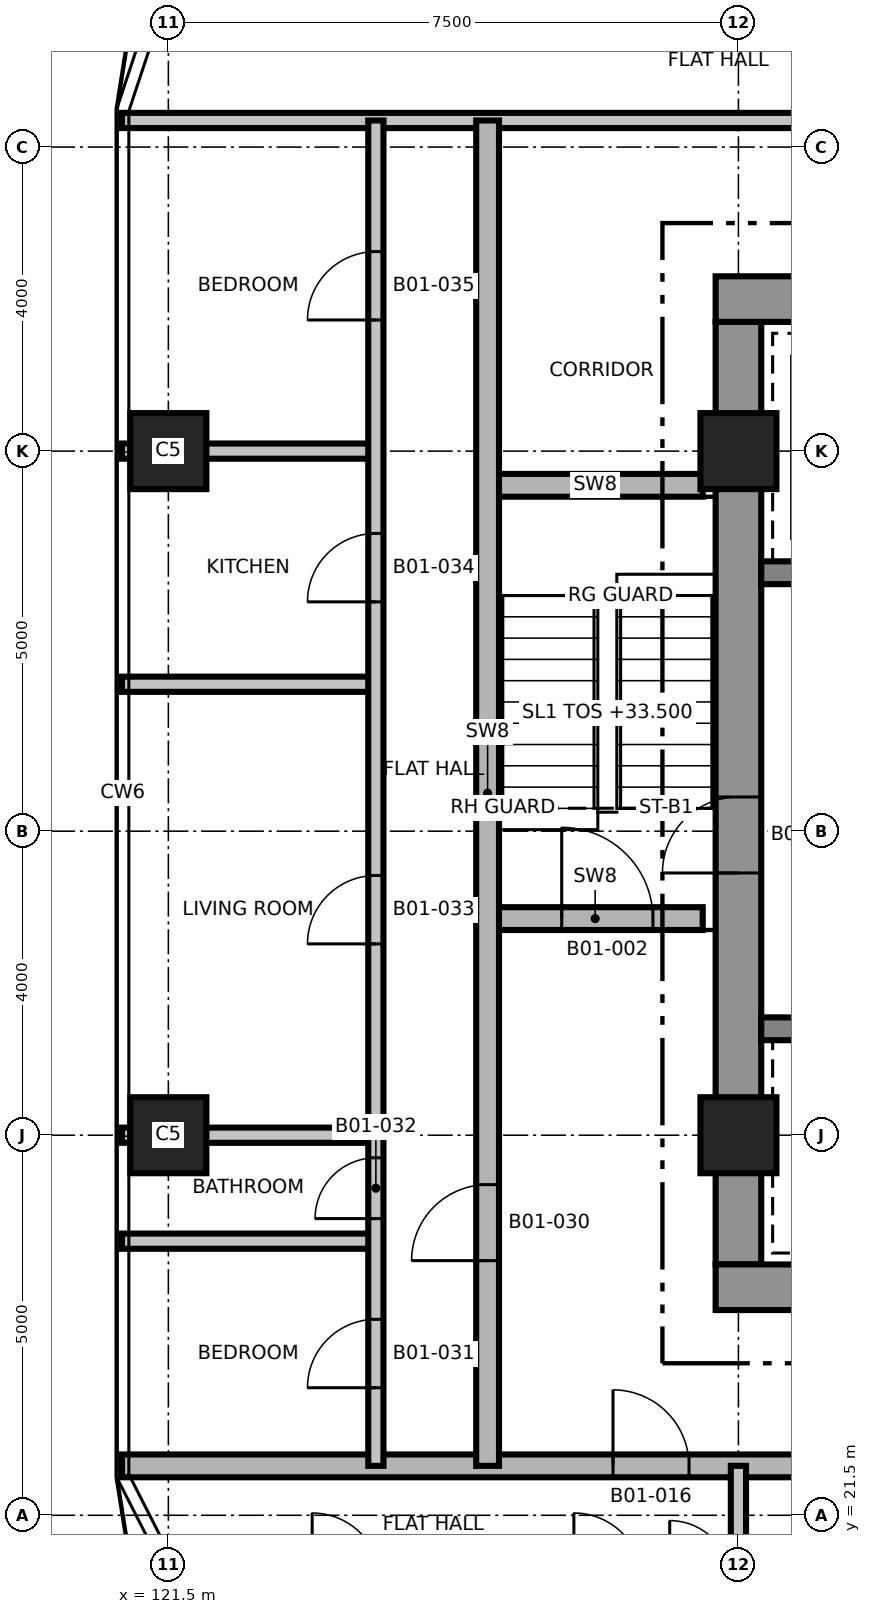
"""IFC4 building model, lengths in metres.
Left out: names, types, materials, properties, quantities, classifications, styles, units other than length and angle.
Written with IfcOpenShell. Run it as: python <this file> out.ifc"""

import sys

from ifc_helpers import new_model, si_unit, direction, frame, frame_2d, origin, origin_2d, place, context, subcontext, project, spatial, rectangle, extrude, element, fill, save


model = new_model("IFC4")
c1 = context("Model", 3, precision=1e-05, world=origin(), true_north=direction((0.0, 1.0)))
c2 = subcontext(c1, "Body", "Model", "MODEL_VIEW")
j1 = project(units=[si_unit("LENGTHUNIT", "METRE"), si_unit("PLANEANGLEUNIT", "RADIAN")], contexts=[c1])
p1 = place(None, origin())
s1 = spatial("IfcSite", under=j1, at=p1, CompositionType="ELEMENT")
p2 = place(p1, origin())
s2 = spatial("IfcBuilding", under=s1, at=p2, CompositionType="ELEMENT")
p3 = place(p2, frame((0.0, 0.0, 33.5)))
s3 = spatial("IfcBuildingStorey", under=s2, at=p3, CompositionType="ELEMENT", Elevation=33.5)
p4 = place(p3, frame((129.0, 24.8, 0.0), z_axis=(0.0, 0.0, 1.0), x_axis=(0.0, 1.0, 0.0)))
e1 = element("IfcWall", 1, at=p4, inside=s3, PredefinedType="SHEAR", context=c2, shape_type="SweptSolid", body=[
    extrude(rectangle(XDim=12.4, YDim=0.6, at=frame_2d((6.2, 0.0))), origin(), (0.0, 0.0, 1.0), 3.7),
])
p5 = place(p4, frame((5.15, 0.0, 0.0)))
e2 = element("IfcOpeningElement", 2, at=p5, cuts=e1, PredefinedType="OPENING", context=c2, shape_type="SweptSolid", body=[
    extrude(rectangle(XDim=1.0, YDim=2.1, at=frame_2d((0.5, 1.05))), frame((0.0, 0.31, 0.0), z_axis=(0.0, -1.0, 0.0), x_axis=(1.0, 0.0, 0.0)), (0.0, 0.0, 1.0), 0.62),
])
p6 = place(p3, frame((128.7, 24.5, 0.0), z_axis=(0.0, 0.0, 1.0), x_axis=(1.0, 0.0, 0.0)))
e3 = element("IfcWall", 3, at=p6, inside=s3, PredefinedType="SHEAR", context=c2, shape_type="SweptSolid", body=[
    extrude(rectangle(XDim=15.0, YDim=0.6, at=frame_2d((7.5, 0.0))), origin(), (0.0, 0.0, 1.0), 3.7),
])
p7 = place(p6, frame((9.65, 0.0, 0.0)))
e4 = element("IfcOpeningElement", 4, at=p7, cuts=e3, PredefinedType="OPENING", context=c2, shape_type="SweptSolid", body=[
    extrude(rectangle(XDim=1.5, YDim=2.1, at=frame_2d((0.75, 1.05))), frame((0.0, 0.31, 0.0), z_axis=(0.0, -1.0, 0.0), x_axis=(1.0, 0.0, 0.0)), (0.0, 0.0, 1.0), 0.62),
])
p8 = place(p6, frame((1.25, 0.0, 0.0)))
e5 = element("IfcOpeningElement", 5, at=p8, cuts=e3, PredefinedType="OPENING", context=c2, shape_type="SweptSolid", body=[
    extrude(rectangle(XDim=0.9, YDim=2.1, at=frame_2d((0.45, 1.05))), frame((0.0, 0.31, 0.0), z_axis=(0.0, -1.0, 0.0), x_axis=(1.0, 0.0, 0.0)), (0.0, 0.0, 1.0), 0.62),
])
p9 = place(p3, frame((128.7, 37.5, 0.0), z_axis=(0.0, 0.0, 1.0), x_axis=(1.0, 0.0, 0.0)))
e6 = element("IfcWall", 6, at=p9, inside=s3, PredefinedType="SHEAR", context=c2, shape_type="SweptSolid", body=[
    extrude(rectangle(XDim=15.0, YDim=0.6, at=frame_2d((7.5, 0.0))), origin(), (0.0, 0.0, 1.0), 3.7),
])
p10 = place(p9, frame((9.65, 0.0, 0.0)))
e7 = element("IfcOpeningElement", 7, at=p10, cuts=e6, PredefinedType="OPENING", context=c2, shape_type="SweptSolid", body=[
    extrude(rectangle(XDim=1.5, YDim=2.1, at=frame_2d((0.75, 1.05))), frame((0.0, 0.31, 0.0), z_axis=(0.0, -1.0, 0.0), x_axis=(1.0, 0.0, 0.0)), (0.0, 0.0, 1.0), 0.62),
])
p11 = place(p9, frame((12.85, 0.0, 0.0)))
e8 = element("IfcOpeningElement", 8, at=p11, cuts=e6, PredefinedType="OPENING", context=c2, shape_type="SweptSolid", body=[
    extrude(rectangle(XDim=0.9, YDim=2.1, at=frame_2d((0.45, 1.05))), frame((0.0, 0.31, 0.0), z_axis=(0.0, -1.0, 0.0), x_axis=(1.0, 0.0, 0.0)), (0.0, 0.0, 1.0), 0.62),
])
p12 = place(p9, frame((4.3, 0.0, 0.0)))
e9 = element("IfcOpeningElement", 9, at=p12, cuts=e6, PredefinedType="OPENING", context=c2, shape_type="SweptSolid", body=[
    extrude(rectangle(XDim=0.9, YDim=2.1, at=frame_2d((0.45, 1.05))), frame((0.0, 0.31, 0.0), z_axis=(0.0, -1.0, 0.0), x_axis=(1.0, 0.0, 0.0)), (0.0, 0.0, 1.0), 0.62),
])
p13 = place(p9, frame((7.2, 0.0, 0.0)))
e10 = element("IfcOpeningElement", 10, at=p13, cuts=e6, PredefinedType="OPENING", context=c2, shape_type="SweptSolid", body=[
    extrude(rectangle(XDim=0.9, YDim=2.1, at=frame_2d((0.45, 1.05))), frame((0.0, 0.31, 0.0), z_axis=(0.0, -1.0, 0.0), x_axis=(1.0, 0.0, 0.0)), (0.0, 0.0, 1.0), 0.62),
])
p14 = place(p3, frame((129.3, 27.9, 0.0), z_axis=(0.0, 0.0, 1.0), x_axis=(1.0, 0.0, 0.0)))
e11 = element("IfcWall", 11, at=p14, inside=s3, PredefinedType="SHEAR", context=c2, shape_type="SweptSolid", body=[
    extrude(rectangle(XDim=2.65, YDim=0.3, at=frame_2d((1.325, 0.0))), origin(), (0.0, 0.0, 1.0), 3.7),
])
p15 = place(p3, frame((129.3, 33.9, 0.0), z_axis=(0.0, 0.0, 1.0), x_axis=(1.0, 0.0, 0.0)))
e12 = element("IfcWall", 12, at=p15, inside=s3, PredefinedType="SHEAR", context=c2, shape_type="SweptSolid", body=[
    extrude(rectangle(XDim=2.65, YDim=0.3, at=frame_2d((1.325, 0.0))), origin(), (0.0, 0.0, 1.0), 3.7),
])
p16 = place(p15, frame((1.05, 0.0, 0.0)))
e13 = element("IfcOpeningElement", 13, at=p16, cuts=e12, PredefinedType="OPENING", context=c2, shape_type="SweptSolid", body=[
    extrude(rectangle(XDim=1.3, YDim=2.4, at=frame_2d((0.65, 1.2))), frame((0.0, 0.16, 0.0), z_axis=(0.0, -1.0, 0.0), x_axis=(1.0, 0.0, 0.0)), (0.0, 0.0, 1.0), 0.32),
])
for number, where, z_axis, x_axis in (
    (14, (121.5, 26.5, 0.0), (0.0, 0.0, 1.0), (1.0, 0.0, 0.0)),
    (15, (129.0, 26.5, 0.0), (0.0, 0.0, 1.0), (1.0, 0.0, 0.0)),
    (16, (121.5, 35.5, 0.0), (0.0, 0.0, 1.0), (1.0, 0.0, 0.0)),
    (17, (129.0, 35.5, 0.0), (0.0, 0.0, 1.0), (1.0, 0.0, 0.0)),
):
    element("IfcColumn", number, at=place(p3, frame(where, z_axis=z_axis, x_axis=x_axis)), inside=s3, PredefinedType="COLUMN", context=c2, shape_type="SweptSolid", body=[
        extrude(rectangle(XDim=1.0, YDim=1.0, at=origin_2d()), origin(), (0.0, 0.0, 1.0), 3.7),
    ])
p17 = place(p3, frame((120.89, 22.15, 0.0), z_axis=(0.0, 0.0, 1.0), x_axis=(1.0, 0.0, 0.0)))
e18 = element("IfcWall", 18, at=p17, inside=s3, PredefinedType="SHEAR", context=c2, shape_type="SweptSolid", body=[
    extrude(rectangle(XDim=31.22, YDim=0.3, at=frame_2d((15.61, 0.0))), origin(), (0.0, 0.0, 1.0), 3.4),
])
p18 = place(p17, frame((21.86, 0.0, 0.0)))
e19 = element("IfcOpeningElement", 19, at=p18, cuts=e18, PredefinedType="OPENING", context=c2, shape_type="SweptSolid", body=[
    extrude(rectangle(XDim=1.0, YDim=2.1, at=frame_2d((0.5, 1.05))), frame((0.0, 0.16, 0.0), z_axis=(0.0, -1.0, 0.0), x_axis=(1.0, 0.0, 0.0)), (0.0, 0.0, 1.0), 0.32),
])
p19 = place(p17, frame((6.46, 0.0, 0.0)))
e20 = element("IfcOpeningElement", 20, at=p19, cuts=e18, PredefinedType="OPENING", context=c2, shape_type="SweptSolid", body=[
    extrude(rectangle(XDim=1.0, YDim=2.1, at=frame_2d((0.5, 1.05))), frame((0.0, 0.16, 0.0), z_axis=(0.0, -1.0, 0.0), x_axis=(1.0, 0.0, 0.0)), (0.0, 0.0, 1.0), 0.32),
])
p20 = place(p17, frame((11.36, 0.0, 0.0)))
e21 = element("IfcOpeningElement", 21, at=p20, cuts=e18, PredefinedType="OPENING", context=c2, shape_type="SweptSolid", body=[
    extrude(rectangle(XDim=1.0, YDim=2.1, at=frame_2d((0.5, 1.05))), frame((0.0, 0.16, 0.0), z_axis=(0.0, -1.0, 0.0), x_axis=(1.0, 0.0, 0.0)), (0.0, 0.0, 1.0), 0.32),
])
p21 = place(p17, frame((23.76, 0.0, 0.0)))
e22 = element("IfcOpeningElement", 22, at=p21, cuts=e18, PredefinedType="OPENING", context=c2, shape_type="SweptSolid", body=[
    extrude(rectangle(XDim=1.0, YDim=2.1, at=frame_2d((0.5, 1.05))), frame((0.0, 0.16, 0.0), z_axis=(0.0, -1.0, 0.0), x_axis=(1.0, 0.0, 0.0)), (0.0, 0.0, 1.0), 0.32),
])
p22 = place(p17, frame((15.86, 0.0, 0.0)))
e23 = element("IfcOpeningElement", 23, at=p22, cuts=e18, PredefinedType="OPENING", context=c2, shape_type="SweptSolid", body=[
    extrude(rectangle(XDim=0.9, YDim=2.1, at=frame_2d((0.45, 1.05))), frame((0.0, 0.16, 0.0), z_axis=(0.0, -1.0, 0.0), x_axis=(1.0, 0.0, 0.0)), (0.0, 0.0, 1.0), 0.32),
])
for number, where, z_axis, x_axis in (
    (24, (120.89, 25.106, 0.0), (0.0, 0.0, 1.0), (1.0, 0.0, 0.0)),
    (25, (120.89, 26.5, 0.0), (0.0, 0.0, 1.0), (1.0, 0.0, 0.0)),
):
    element("IfcWall", number, at=place(p3, frame(where, z_axis=z_axis, x_axis=x_axis)), inside=s3, PredefinedType="PARTITIONING", context=c2, shape_type="SweptSolid", body=[
        extrude(rectangle(XDim=3.34, YDim=0.2, at=frame_2d((1.67, 0.0))), origin(), (0.0, 0.0, 1.0), 3.4),
    ])
p23 = place(p3, frame((125.7, 29.35, 0.0), z_axis=(0.0, 0.0, 1.0), x_axis=(1.0, 0.0, 0.0)))
e26 = element("IfcWall", 26, at=p23, inside=s3, PredefinedType="SHEAR", context=c2, shape_type="SweptSolid", body=[
    extrude(rectangle(XDim=2.83, YDim=0.3, at=frame_2d((1.415, 0.0))), origin(), (0.0, 0.0, 1.0), 3.4),
])
p24 = place(p23, frame((0.975, 0.0, 0.0)))
e27 = element("IfcOpeningElement", 27, at=p24, cuts=e26, PredefinedType="OPENING", context=c2, shape_type="SweptSolid", body=[
    extrude(rectangle(XDim=1.2, YDim=2.1, at=frame_2d((0.6, 1.05))), frame((0.0, 0.16, 0.0), z_axis=(0.0, -1.0, 0.0), x_axis=(1.0, 0.0, 0.0)), (0.0, 0.0, 1.0), 0.32),
])
p25 = place(p3, frame((120.89, 32.433, 0.0), z_axis=(0.0, 0.0, 1.0), x_axis=(1.0, 0.0, 0.0)))
e28 = element("IfcWall", 28, at=p25, inside=s3, PredefinedType="PARTITIONING", context=c2, shape_type="SweptSolid", body=[
    extrude(rectangle(XDim=3.34, YDim=0.2, at=frame_2d((1.67, 0.0))), origin(), (0.0, 0.0, 1.0), 3.4),
])
p26 = place(p3, frame((125.7, 35.05, 0.0), z_axis=(0.0, 0.0, 1.0), x_axis=(1.0, 0.0, 0.0)))
e29 = element("IfcWall", 29, at=p26, inside=s3, PredefinedType="SHEAR", context=c2, shape_type="SweptSolid", body=[
    extrude(rectangle(XDim=2.83, YDim=0.3, at=frame_2d((1.415, 0.0))), origin(), (0.0, 0.0, 1.0), 3.4),
])
p27 = place(p3, frame((120.89, 35.5, 0.0), z_axis=(0.0, 0.0, 1.0), x_axis=(1.0, 0.0, 0.0)))
e30 = element("IfcWall", 30, at=p27, inside=s3, PredefinedType="PARTITIONING", context=c2, shape_type="SweptSolid", body=[
    extrude(rectangle(XDim=3.34, YDim=0.2, at=frame_2d((1.67, 0.0))), origin(), (0.0, 0.0, 1.0), 3.4),
])
p28 = place(p3, frame((120.89, 39.85, 0.0), z_axis=(0.0, 0.0, 1.0), x_axis=(1.0, 0.0, 0.0)))
e31 = element("IfcWall", 31, at=p28, inside=s3, PredefinedType="PARTITIONING", context=c2, shape_type="SweptSolid", body=[
    extrude(rectangle(XDim=31.22, YDim=0.2, at=frame_2d((15.61, 0.0))), origin(), (0.0, 0.0, 1.0), 3.4),
])
p29 = place(p28, frame((10.21, 0.0, 0.0)))
e32 = element("IfcOpeningElement", 32, at=p29, cuts=e31, PredefinedType="OPENING", context=c2, shape_type="SweptSolid", body=[
    extrude(rectangle(XDim=1.0, YDim=2.1, at=frame_2d((0.5, 1.05))), frame((0.0, 0.11, 0.0), z_axis=(0.0, -1.0, 0.0), x_axis=(1.0, 0.0, 0.0)), (0.0, 0.0, 1.0), 0.22),
])
p30 = place(p28, frame((20.01, 0.0, 0.0)))
e33 = element("IfcOpeningElement", 33, at=p30, cuts=e31, PredefinedType="OPENING", context=c2, shape_type="SweptSolid", body=[
    extrude(rectangle(XDim=1.0, YDim=2.1, at=frame_2d((0.5, 1.05))), frame((0.0, 0.11, 0.0), z_axis=(0.0, -1.0, 0.0), x_axis=(1.0, 0.0, 0.0)), (0.0, 0.0, 1.0), 0.22),
])
p31 = place(p3, frame((124.23, 22.15, 0.0), z_axis=(0.0, 0.0, 1.0), x_axis=(0.0, 1.0, 0.0)))
e34 = element("IfcWall", 34, at=p31, inside=s3, PredefinedType="PARTITIONING", context=c2, shape_type="SweptSolid", body=[
    extrude(rectangle(XDim=17.7, YDim=0.2, at=frame_2d((8.85, 0.0))), origin(), (0.0, 0.0, 1.0), 3.4),
])
p32 = place(p31, frame((1.028, 0.0, 0.0)))
e35 = element("IfcOpeningElement", 35, at=p32, cuts=e34, PredefinedType="OPENING", context=c2, shape_type="SweptSolid", body=[
    extrude(rectangle(XDim=0.9, YDim=2.1, at=frame_2d((0.45, 1.05))), frame((0.0, 0.11, 0.0), z_axis=(0.0, -1.0, 0.0), x_axis=(1.0, 0.0, 0.0)), (0.0, 0.0, 1.0), 0.22),
])
p33 = place(p31, frame((3.253, 0.0, 0.0)))
e36 = element("IfcOpeningElement", 36, at=p33, cuts=e34, PredefinedType="OPENING", context=c2, shape_type="SweptSolid", body=[
    extrude(rectangle(XDim=0.8, YDim=2.1, at=frame_2d((0.4, 1.05))), frame((0.0, 0.11, 0.0), z_axis=(0.0, -1.0, 0.0), x_axis=(1.0, 0.0, 0.0)), (0.0, 0.0, 1.0), 0.22),
])
p34 = place(p31, frame((6.867, 0.0, 0.0)))
e37 = element("IfcOpeningElement", 37, at=p34, cuts=e34, PredefinedType="OPENING", context=c2, shape_type="SweptSolid", body=[
    extrude(rectangle(XDim=0.9, YDim=2.1, at=frame_2d((0.45, 1.05))), frame((0.0, 0.11, 0.0), z_axis=(0.0, -1.0, 0.0), x_axis=(1.0, 0.0, 0.0)), (0.0, 0.0, 1.0), 0.22),
])
p35 = place(p31, frame((11.367, 0.0, 0.0)))
e38 = element("IfcOpeningElement", 38, at=p35, cuts=e34, PredefinedType="OPENING", context=c2, shape_type="SweptSolid", body=[
    extrude(rectangle(XDim=0.9, YDim=2.1, at=frame_2d((0.45, 1.05))), frame((0.0, 0.11, 0.0), z_axis=(0.0, -1.0, 0.0), x_axis=(1.0, 0.0, 0.0)), (0.0, 0.0, 1.0), 0.22),
])
p36 = place(p31, frame((15.075, 0.0, 0.0)))
e39 = element("IfcOpeningElement", 39, at=p36, cuts=e34, PredefinedType="OPENING", context=c2, shape_type="SweptSolid", body=[
    extrude(rectangle(XDim=0.9, YDim=2.1, at=frame_2d((0.45, 1.05))), frame((0.0, 0.11, 0.0), z_axis=(0.0, -1.0, 0.0), x_axis=(1.0, 0.0, 0.0)), (0.0, 0.0, 1.0), 0.22),
])
p37 = place(p3, frame((125.7, 22.15, 0.0), z_axis=(0.0, 0.0, 1.0), x_axis=(0.0, 1.0, 0.0)))
e40 = element("IfcWall", 40, at=p37, inside=s3, PredefinedType="SHEAR", context=c2, shape_type="SweptSolid", body=[
    extrude(rectangle(XDim=17.7, YDim=0.3, at=frame_2d((8.85, 0.0))), origin(), (0.0, 0.0, 1.0), 3.4),
])
p38 = place(p37, frame((2.7, 0.0, 0.0)))
e41 = element("IfcOpeningElement", 41, at=p38, cuts=e40, PredefinedType="OPENING", context=c2, shape_type="SweptSolid", body=[
    extrude(rectangle(XDim=1.0, YDim=2.1, at=frame_2d((0.5, 1.05))), frame((0.0, 0.16, 0.0), z_axis=(0.0, -1.0, 0.0), x_axis=(1.0, 0.0, 0.0)), (0.0, 0.0, 1.0), 0.32),
])
p39 = place(p3, frame((129.0, 16.89, 0.0), z_axis=(0.0, 0.0, 1.0), x_axis=(0.0, 1.0, 0.0)))
e42 = element("IfcWall", 42, at=p39, inside=s3, PredefinedType="PARTITIONING", context=c2, shape_type="SweptSolid", body=[
    extrude(rectangle(XDim=5.26, YDim=0.2, at=frame_2d((2.63, 0.0))), origin(), (0.0, 0.0, 1.0), 3.4),
])
p40 = place(p24, origin())
e43 = element("IfcDoor", 43, at=p40, inside=s3, OperationType="SINGLE_SWING_RIGHT", PredefinedType="DOOR", context=c2, shape_type="SweptSolid", body=[
    extrude(rectangle(XDim=1.2, YDim=2.1, at=frame_2d((0.6, 1.05))), frame((0.0, 0.025, 0.0), z_axis=(0.0, -1.0, 0.0), x_axis=(1.0, 0.0, 0.0)), (0.0, 0.0, 1.0), 0.05),
])
fill(e27, e43)
p41 = place(p19, origin())
e44 = element("IfcDoor", 44, at=p41, inside=s3, OperationType="SINGLE_SWING_RIGHT", PredefinedType="DOOR", context=c2, shape_type="SweptSolid", body=[
    extrude(rectangle(XDim=1.0, YDim=2.1, at=frame_2d((0.5, 1.05))), frame((0.0, 0.025, 0.0), z_axis=(0.0, -1.0, 0.0), x_axis=(1.0, 0.0, 0.0)), (0.0, 0.0, 1.0), 0.05),
])
fill(e20, e44)
p42 = place(p38, origin())
e45 = element("IfcDoor", 45, at=p42, inside=s3, OperationType="SINGLE_SWING_RIGHT", PredefinedType="DOOR", context=c2, shape_type="SweptSolid", body=[
    extrude(rectangle(XDim=1.0, YDim=2.1, at=frame_2d((0.5, 1.05))), frame((0.0, 0.025, 0.0), z_axis=(0.0, -1.0, 0.0), x_axis=(1.0, 0.0, 0.0)), (0.0, 0.0, 1.0), 0.05),
])
fill(e41, e45)
p43 = place(p32, origin())
e46 = element("IfcDoor", 46, at=p43, inside=s3, OperationType="SINGLE_SWING_LEFT", PredefinedType="DOOR", context=c2, shape_type="SweptSolid", body=[
    extrude(rectangle(XDim=0.9, YDim=2.1, at=frame_2d((0.45, 1.05))), frame((0.0, 0.025, 0.0), z_axis=(0.0, -1.0, 0.0), x_axis=(1.0, 0.0, 0.0)), (0.0, 0.0, 1.0), 0.05),
])
fill(e35, e46)
p44 = place(p33, origin())
e47 = element("IfcDoor", 47, at=p44, inside=s3, OperationType="SINGLE_SWING_RIGHT", PredefinedType="DOOR", context=c2, shape_type="SweptSolid", body=[
    extrude(rectangle(XDim=0.8, YDim=2.1, at=frame_2d((0.4, 1.05))), frame((0.0, 0.025, 0.0), z_axis=(0.0, -1.0, 0.0), x_axis=(1.0, 0.0, 0.0)), (0.0, 0.0, 1.0), 0.05),
])
fill(e36, e47)
p45 = place(p34, origin())
e48 = element("IfcDoor", 48, at=p45, inside=s3, OperationType="SINGLE_SWING_LEFT", PredefinedType="DOOR", context=c2, shape_type="SweptSolid", body=[
    extrude(rectangle(XDim=0.9, YDim=2.1, at=frame_2d((0.45, 1.05))), frame((0.0, 0.025, 0.0), z_axis=(0.0, -1.0, 0.0), x_axis=(1.0, 0.0, 0.0)), (0.0, 0.0, 1.0), 0.05),
])
fill(e37, e48)
p46 = place(p35, origin())
e49 = element("IfcDoor", 49, at=p46, inside=s3, OperationType="SINGLE_SWING_RIGHT", PredefinedType="DOOR", context=c2, shape_type="SweptSolid", body=[
    extrude(rectangle(XDim=0.9, YDim=2.1, at=frame_2d((0.45, 1.05))), frame((0.0, 0.025, 0.0), z_axis=(0.0, -1.0, 0.0), x_axis=(1.0, 0.0, 0.0)), (0.0, 0.0, 1.0), 0.05),
])
fill(e38, e49)
p47 = place(p36, origin())
e50 = element("IfcDoor", 50, at=p47, inside=s3, OperationType="SINGLE_SWING_LEFT", PredefinedType="DOOR", context=c2, shape_type="SweptSolid", body=[
    extrude(rectangle(XDim=0.9, YDim=2.1, at=frame_2d((0.45, 1.05))), frame((0.0, 0.025, 0.0), z_axis=(0.0, -1.0, 0.0), x_axis=(1.0, 0.0, 0.0)), (0.0, 0.0, 1.0), 0.05),
])
fill(e39, e50)
p48 = place(p5, origin())
e51 = element("IfcDoor", 51, at=p48, inside=s3, OperationType="SINGLE_SWING_RIGHT", PredefinedType="DOOR", context=c2, shape_type="SweptSolid", body=[
    extrude(rectangle(XDim=1.0, YDim=2.1, at=frame_2d((0.5, 1.05))), frame((0.0, 0.025, 0.0), z_axis=(0.0, -1.0, 0.0), x_axis=(1.0, 0.0, 0.0)), (0.0, 0.0, 1.0), 0.05),
])
fill(e2, e51)
save(model, sys.argv[1])
